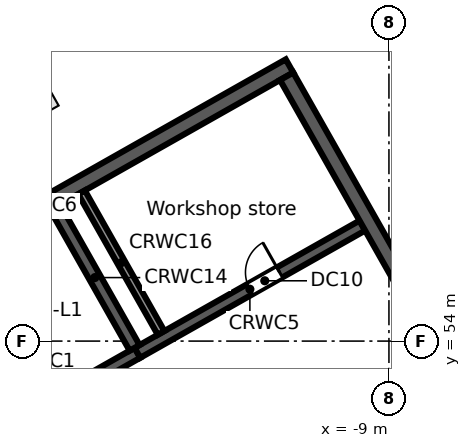
"""IFC4 building model, lengths in metres.
Left out: names, types, materials, properties, quantities, classifications, styles, units other than length and angle.
Written with IfcOpenShell. Run it as: python <this file> out.ifc"""

import sys

from ifc_helpers import new_model, si_unit, direction, frame, frame_2d, origin, origin_2d, place, context, subcontext, project, spatial, rectangle, extrude, element, fill, save


model = new_model("IFC4")
c1 = context("Model", 3, precision=1e-05, world=origin(), true_north=direction((0.0, 1.0)))
c2 = subcontext(c1, "Body", "Model", "MODEL_VIEW")
j1 = project(units=[si_unit("LENGTHUNIT", "METRE"), si_unit("PLANEANGLEUNIT", "RADIAN")], contexts=[c1])
p1 = place(None, origin())
s1 = spatial("IfcSite", under=j1, at=p1, CompositionType="ELEMENT")
p2 = place(p1, origin())
s2 = spatial("IfcBuilding", under=s1, at=p2, CompositionType="ELEMENT")
p3 = place(p2, frame((0.0, 0.0, 308.3)))
s3 = spatial("IfcBuildingStorey", under=s2, at=p3, CompositionType="ELEMENT", Elevation=308.3)
p4 = place(p3, frame((-18.441, 60.406, 0.0), z_axis=(0.0, 0.0, 1.0), x_axis=(-0.87035569594, -0.492423560103, 0.0)))
e1 = element("IfcColumn", 1, at=p4, inside=s3, PredefinedType="COLUMN", context=c2, shape_type="SweptSolid", body=[
    extrude(rectangle(XDim=1.1, YDim=1.1, at=origin_2d()), origin(), (0.0, 0.0, 1.0), 3.8),
])
p5 = place(p3, frame((-58.732, 38.771, 0.0), z_axis=(0.0, 0.0, 1.0), x_axis=(0.870355615581, 0.492423702137, 0.0)))
e2 = element("IfcWall", 2, at=p5, inside=s3, PredefinedType="STANDARD", context=c2, shape_type="SweptSolid", body=[
    extrude(rectangle(XDim=64.052, YDim=0.25, at=frame_2d((32.026, 0.0))), origin(), (0.0, 0.0, 1.0), 3.45),
])
p6 = place(p5, frame((61.259, 0.0, 0.8)))
e3 = element("IfcOpeningElement", 3, at=p6, cuts=e2, PredefinedType="OPENING", context=c2, shape_type="SweptSolid", body=[
    extrude(rectangle(XDim=2.4, YDim=2.2, at=frame_2d((1.2, 1.1))), frame((0.0, 0.135, 0.0), z_axis=(0.0, -1.0, 0.0), x_axis=(1.0, 0.0, 0.0)), (0.0, 0.0, 1.0), 0.27),
])
p7 = place(p5, frame((58.216, 0.0, 0.8)))
e4 = element("IfcOpeningElement", 4, at=p7, cuts=e2, PredefinedType="OPENING", context=c2, shape_type="SweptSolid", body=[
    extrude(rectangle(XDim=2.4, YDim=2.2, at=frame_2d((1.2, 1.1))), frame((0.0, 0.135, 0.0), z_axis=(0.0, -1.0, 0.0), x_axis=(1.0, 0.0, 0.0)), (0.0, 0.0, 1.0), 0.27),
])
p8 = place(p5, frame((55.173, 0.0, 0.8)))
e5 = element("IfcOpeningElement", 5, at=p8, cuts=e2, PredefinedType="OPENING", context=c2, shape_type="SweptSolid", body=[
    extrude(rectangle(XDim=2.4, YDim=2.2, at=frame_2d((1.2, 1.1))), frame((0.0, 0.135, 0.0), z_axis=(0.0, -1.0, 0.0), x_axis=(1.0, 0.0, 0.0)), (0.0, 0.0, 1.0), 0.27),
])
p9 = place(p5, frame((52.129, 0.0, 0.8)))
e6 = element("IfcOpeningElement", 6, at=p9, cuts=e2, PredefinedType="OPENING", context=c2, shape_type="SweptSolid", body=[
    extrude(rectangle(XDim=2.4, YDim=2.2, at=frame_2d((1.2, 1.1))), frame((0.0, 0.135, 0.0), z_axis=(0.0, -1.0, 0.0), x_axis=(1.0, 0.0, 0.0)), (0.0, 0.0, 1.0), 0.27),
])
p10 = place(p5, frame((49.086, 0.0, 0.8)))
e7 = element("IfcOpeningElement", 7, at=p10, cuts=e2, PredefinedType="OPENING", context=c2, shape_type="SweptSolid", body=[
    extrude(rectangle(XDim=2.4, YDim=2.2, at=frame_2d((1.2, 1.1))), frame((0.0, 0.135, 0.0), z_axis=(0.0, -1.0, 0.0), x_axis=(1.0, 0.0, 0.0)), (0.0, 0.0, 1.0), 0.27),
])
p11 = place(p5, frame((46.043, 0.0, 0.8)))
e8 = element("IfcOpeningElement", 8, at=p11, cuts=e2, PredefinedType="OPENING", context=c2, shape_type="SweptSolid", body=[
    extrude(rectangle(XDim=2.4, YDim=2.2, at=frame_2d((1.2, 1.1))), frame((0.0, 0.135, 0.0), z_axis=(0.0, -1.0, 0.0), x_axis=(1.0, 0.0, 0.0)), (0.0, 0.0, 1.0), 0.27),
])
p12 = place(p5, frame((43.0, 0.0, 0.8)))
e9 = element("IfcOpeningElement", 9, at=p12, cuts=e2, PredefinedType="OPENING", context=c2, shape_type="SweptSolid", body=[
    extrude(rectangle(XDim=2.4, YDim=2.2, at=frame_2d((1.2, 1.1))), frame((0.0, 0.135, 0.0), z_axis=(0.0, -1.0, 0.0), x_axis=(1.0, 0.0, 0.0)), (0.0, 0.0, 1.0), 0.27),
])
p13 = place(p5, frame((39.956, 0.0, 0.8)))
e10 = element("IfcOpeningElement", 10, at=p13, cuts=e2, PredefinedType="OPENING", context=c2, shape_type="SweptSolid", body=[
    extrude(rectangle(XDim=2.4, YDim=2.2, at=frame_2d((1.2, 1.1))), frame((0.0, 0.135, 0.0), z_axis=(0.0, -1.0, 0.0), x_axis=(1.0, 0.0, 0.0)), (0.0, 0.0, 1.0), 0.27),
])
p14 = place(p5, frame((36.913, 0.0, 0.8)))
e11 = element("IfcOpeningElement", 11, at=p14, cuts=e2, PredefinedType="OPENING", context=c2, shape_type="SweptSolid", body=[
    extrude(rectangle(XDim=2.4, YDim=2.2, at=frame_2d((1.2, 1.1))), frame((0.0, 0.135, 0.0), z_axis=(0.0, -1.0, 0.0), x_axis=(1.0, 0.0, 0.0)), (0.0, 0.0, 1.0), 0.27),
])
p15 = place(p5, frame((33.87, 0.0, 0.8)))
e12 = element("IfcOpeningElement", 12, at=p15, cuts=e2, PredefinedType="OPENING", context=c2, shape_type="SweptSolid", body=[
    extrude(rectangle(XDim=2.4, YDim=2.2, at=frame_2d((1.2, 1.1))), frame((0.0, 0.135, 0.0), z_axis=(0.0, -1.0, 0.0), x_axis=(1.0, 0.0, 0.0)), (0.0, 0.0, 1.0), 0.27),
])
p16 = place(p5, frame((30.826, 0.0, 0.8)))
e13 = element("IfcOpeningElement", 13, at=p16, cuts=e2, PredefinedType="OPENING", context=c2, shape_type="SweptSolid", body=[
    extrude(rectangle(XDim=2.4, YDim=2.2, at=frame_2d((1.2, 1.1))), frame((0.0, 0.135, 0.0), z_axis=(0.0, -1.0, 0.0), x_axis=(1.0, 0.0, 0.0)), (0.0, 0.0, 1.0), 0.27),
])
p17 = place(p5, frame((27.783, 0.0, 0.8)))
e14 = element("IfcOpeningElement", 14, at=p17, cuts=e2, PredefinedType="OPENING", context=c2, shape_type="SweptSolid", body=[
    extrude(rectangle(XDim=2.4, YDim=2.2, at=frame_2d((1.2, 1.1))), frame((0.0, 0.135, 0.0), z_axis=(0.0, -1.0, 0.0), x_axis=(1.0, 0.0, 0.0)), (0.0, 0.0, 1.0), 0.27),
])
p18 = place(p5, frame((24.74, 0.0, 0.8)))
e15 = element("IfcOpeningElement", 15, at=p18, cuts=e2, PredefinedType="OPENING", context=c2, shape_type="SweptSolid", body=[
    extrude(rectangle(XDim=2.4, YDim=2.2, at=frame_2d((1.2, 1.1))), frame((0.0, 0.135, 0.0), z_axis=(0.0, -1.0, 0.0), x_axis=(1.0, 0.0, 0.0)), (0.0, 0.0, 1.0), 0.27),
])
p19 = place(p5, frame((21.696, 0.0, 0.8)))
e16 = element("IfcOpeningElement", 16, at=p19, cuts=e2, PredefinedType="OPENING", context=c2, shape_type="SweptSolid", body=[
    extrude(rectangle(XDim=2.4, YDim=2.2, at=frame_2d((1.2, 1.1))), frame((0.0, 0.135, 0.0), z_axis=(0.0, -1.0, 0.0), x_axis=(1.0, 0.0, 0.0)), (0.0, 0.0, 1.0), 0.27),
])
p20 = place(p5, frame((18.653, 0.0, 0.8)))
e17 = element("IfcOpeningElement", 17, at=p20, cuts=e2, PredefinedType="OPENING", context=c2, shape_type="SweptSolid", body=[
    extrude(rectangle(XDim=2.4, YDim=2.2, at=frame_2d((1.2, 1.1))), frame((0.0, 0.135, 0.0), z_axis=(0.0, -1.0, 0.0), x_axis=(1.0, 0.0, 0.0)), (0.0, 0.0, 1.0), 0.27),
])
p21 = place(p5, frame((15.61, 0.0, 0.8)))
e18 = element("IfcOpeningElement", 18, at=p21, cuts=e2, PredefinedType="OPENING", context=c2, shape_type="SweptSolid", body=[
    extrude(rectangle(XDim=2.4, YDim=2.2, at=frame_2d((1.2, 1.1))), frame((0.0, 0.135, 0.0), z_axis=(0.0, -1.0, 0.0), x_axis=(1.0, 0.0, 0.0)), (0.0, 0.0, 1.0), 0.27),
])
p22 = place(p5, frame((12.567, 0.0, 0.8)))
e19 = element("IfcOpeningElement", 19, at=p22, cuts=e2, PredefinedType="OPENING", context=c2, shape_type="SweptSolid", body=[
    extrude(rectangle(XDim=2.4, YDim=2.2, at=frame_2d((1.2, 1.1))), frame((0.0, 0.135, 0.0), z_axis=(0.0, -1.0, 0.0), x_axis=(1.0, 0.0, 0.0)), (0.0, 0.0, 1.0), 0.27),
])
p23 = place(p5, frame((9.523, 0.0, 0.8)))
e20 = element("IfcOpeningElement", 20, at=p23, cuts=e2, PredefinedType="OPENING", context=c2, shape_type="SweptSolid", body=[
    extrude(rectangle(XDim=2.4, YDim=2.2, at=frame_2d((1.2, 1.1))), frame((0.0, 0.135, 0.0), z_axis=(0.0, -1.0, 0.0), x_axis=(1.0, 0.0, 0.0)), (0.0, 0.0, 1.0), 0.27),
])
p24 = place(p5, frame((6.48, 0.0, 0.8)))
e21 = element("IfcOpeningElement", 21, at=p24, cuts=e2, PredefinedType="OPENING", context=c2, shape_type="SweptSolid", body=[
    extrude(rectangle(XDim=2.4, YDim=2.2, at=frame_2d((1.2, 1.1))), frame((0.0, 0.135, 0.0), z_axis=(0.0, -1.0, 0.0), x_axis=(1.0, 0.0, 0.0)), (0.0, 0.0, 1.0), 0.27),
])
p25 = place(p5, frame((3.437, 0.0, 0.8)))
e22 = element("IfcOpeningElement", 22, at=p25, cuts=e2, PredefinedType="OPENING", context=c2, shape_type="SweptSolid", body=[
    extrude(rectangle(XDim=2.4, YDim=2.2, at=frame_2d((1.2, 1.1))), frame((0.0, 0.135, 0.0), z_axis=(0.0, -1.0, 0.0), x_axis=(1.0, 0.0, 0.0)), (0.0, 0.0, 1.0), 0.27),
])
p26 = place(p5, frame((0.393, 0.0, 0.8)))
e23 = element("IfcOpeningElement", 23, at=p26, cuts=e2, PredefinedType="OPENING", context=c2, shape_type="SweptSolid", body=[
    extrude(rectangle(XDim=2.4, YDim=2.2, at=frame_2d((1.2, 1.1))), frame((0.0, 0.135, 0.0), z_axis=(0.0, -1.0, 0.0), x_axis=(1.0, 0.0, 0.0)), (0.0, 0.0, 1.0), 0.27),
])
p27 = place(p3, frame((-13.365, 49.911, 0.0), z_axis=(0.0, 0.0, 1.0), x_axis=(0.870347618718, 0.492437836272, 0.0)))
e24 = element("IfcWall", 24, at=p27, inside=s3, PredefinedType="SOLIDWALL", context=c2, shape_type="SweptSolid", body=[
    extrude(rectangle(XDim=6.7, YDim=0.3, at=frame_2d((3.35, 0.0))), origin(), (0.0, 0.0, 1.0), 3.45),
])
p28 = place(p27, frame((2.95, 0.0, 0.0)))
e25 = element("IfcOpeningElement", 25, at=p28, cuts=e24, PredefinedType="OPENING", context=c2, shape_type="SweptSolid", body=[
    extrude(rectangle(XDim=0.9, YDim=2.1, at=frame_2d((0.45, 1.05))), frame((0.0, 0.16, 0.0), z_axis=(0.0, -1.0, 0.0), x_axis=(1.0, 0.0, 0.0)), (0.0, 0.0, 1.0), 0.32),
])
p29 = place(p3, frame((-22.059, 50.047, 0.0), z_axis=(0.0, 0.0, 1.0), x_axis=(0.87035077051, 0.49243226567, 0.0)))
e26 = element("IfcWall", 26, at=p29, inside=s3, PredefinedType="SOLIDWALL", context=c2, shape_type="SweptSolid", body=[
    extrude(rectangle(XDim=7.4, YDim=0.3, at=frame_2d((3.7, 0.0))), origin(), (0.0, 0.0, 1.0), 3.45),
])
p30 = place(p29, frame((0.4, 0.0, 0.0)))
e27 = element("IfcOpeningElement", 27, at=p30, cuts=e26, PredefinedType="OPENING", context=c2, shape_type="SweptSolid", body=[
    extrude(rectangle(XDim=1.0, YDim=2.1, at=frame_2d((0.5, 1.05))), frame((0.0, 0.16, 0.0), z_axis=(0.0, -1.0, 0.0), x_axis=(1.0, 0.0, 0.0)), (0.0, 0.0, 1.0), 0.32),
])
p31 = place(p3, frame((-15.618, 53.691, 0.0), z_axis=(0.0, 0.0, 1.0), x_axis=(0.870362830851, 0.492410948978, 0.0)))
e28 = element("IfcWall", 28, at=p31, inside=s3, PredefinedType="SOLIDWALL", context=c2, shape_type="SweptSolid", body=[
    extrude(rectangle(XDim=6.8, YDim=0.3, at=frame_2d((3.4, 0.0))), origin(), (0.0, 0.0, 1.0), 3.45),
])
p32 = place(p31, frame((3.4, 0.0, 0.0)))
e29 = element("IfcOpeningElement", 29, at=p32, cuts=e28, PredefinedType="OPENING", context=c2, shape_type="SweptSolid", body=[
    extrude(rectangle(XDim=0.9, YDim=2.1, at=frame_2d((0.45, 1.05))), frame((0.0, 0.16, 0.0), z_axis=(0.0, -1.0, 0.0), x_axis=(1.0, 0.0, 0.0)), (0.0, 0.0, 1.0), 0.32),
])
p33 = place(p3, frame((-24.672, 53.854, 0.0), z_axis=(0.0, 0.0, 1.0), x_axis=(0.870353598469, 0.492427267353, 0.0)))
e30 = element("IfcWall", 30, at=p33, inside=s3, PredefinedType="SOLIDWALL", context=c2, shape_type="SweptSolid", body=[
    extrude(rectangle(XDim=15.0, YDim=0.4, at=frame_2d((7.5, 0.0))), origin(), (0.0, 0.0, 1.0), 3.45),
])
p34 = place(p3, frame((-24.4, 53.779, 0.0), z_axis=(0.0, 0.0, 1.0), x_axis=(0.492421663121, -0.870356769198, 0.0)))
e31 = element("IfcWall", 31, at=p34, inside=s3, PredefinedType="SOLIDWALL", context=c2, shape_type="SweptSolid", body=[
    extrude(rectangle(XDim=13.2, YDim=0.4, at=frame_2d((6.6, 0.0))), origin(), (0.0, 0.0, 1.0), 3.45),
])
p35 = place(p3, frame((-17.785, 57.521, 0.0), z_axis=(0.0, 0.0, 1.0), x_axis=(0.492422543467, -0.870356271124, 0.0)))
e32 = element("IfcWall", 32, at=p35, inside=s3, PredefinedType="SOLIDWALL", context=c2, shape_type="SweptSolid", body=[
    extrude(rectangle(XDim=4.25, YDim=0.3, at=frame_2d((2.125, 0.0))), origin(), (0.0, 0.0, 1.0), 3.45),
])
p36 = place(p3, frame((-17.089, 57.915, 0.0), z_axis=(0.0, 0.0, 1.0), x_axis=(0.492422543467, -0.870356271124, 0.0)))
e33 = element("IfcWall", 33, at=p36, inside=s3, PredefinedType="SOLIDWALL", context=c2, shape_type="SweptSolid", body=[
    extrude(rectangle(XDim=4.25, YDim=0.2, at=frame_2d((2.125, 0.0))), origin(), (0.0, 0.0, 1.0), 3.45),
])
p37 = place(p3, frame((-11.692, 60.968, 0.0), z_axis=(0.0, 0.0, 1.0), x_axis=(0.492421663121, -0.870356769198, 0.0)))
e34 = element("IfcWall", 34, at=p37, inside=s3, PredefinedType="SOLIDWALL", context=c2, shape_type="SweptSolid", body=[
    extrude(rectangle(XDim=13.2, YDim=0.4, at=frame_2d((6.6, 0.0))), origin(), (0.0, 0.0, 1.0), 3.45),
])
p38 = place(p11, origin())
e35 = element("IfcWindow", 35, at=p38, inside=s3, PartitioningType="SINGLE_PANEL", PredefinedType="WINDOW", context=c2, shape_type="SweptSolid", body=[
    extrude(rectangle(XDim=2.4, YDim=2.2, at=frame_2d((1.2, 1.1))), frame((0.0, 0.03, 0.0), z_axis=(0.0, -1.0, 0.0), x_axis=(1.0, 0.0, 0.0)), (0.0, 0.0, 1.0), 0.06),
])
fill(e8, e35)
p39 = place(p32, origin())
e36 = element("IfcDoor", 36, at=p39, inside=s3, OperationType="SINGLE_SWING_RIGHT", PredefinedType="DOOR", context=c2, shape_type="SweptSolid", body=[
    extrude(rectangle(XDim=0.9, YDim=2.1, at=frame_2d((0.45, 1.05))), frame((0.0, 0.025, 0.0), z_axis=(0.0, -1.0, 0.0), x_axis=(1.0, 0.0, 0.0)), (0.0, 0.0, 1.0), 0.05),
])
fill(e29, e36)
save(model, sys.argv[1])
